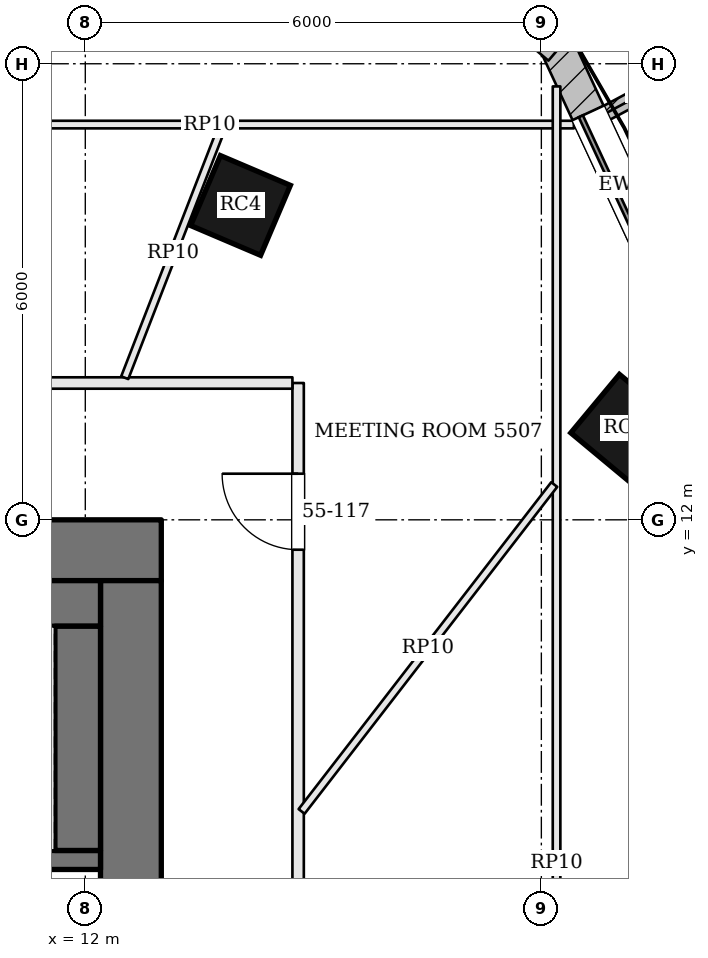
"""IFC4 building model, lengths in metres.
Left out: names, types, materials, properties, quantities, classifications, styles, units other than length and angle.
Written with IfcOpenShell. Run it as: python <this file> out.ifc"""

import sys

from ifc_helpers import new_model, si_unit, direction, frame, frame_2d, origin, origin_2d, place, context, subcontext, project, spatial, rectangle, extrude, element, fill, save


model = new_model("IFC4")
c1 = context("Model", 3, precision=1e-05, world=origin(), true_north=direction((0.0, 1.0)))
c2 = subcontext(c1, "Body", "Model", "MODEL_VIEW")
j1 = project(units=[si_unit("LENGTHUNIT", "METRE"), si_unit("PLANEANGLEUNIT", "RADIAN")], contexts=[c1])
p1 = place(None, origin())
s1 = spatial("IfcSite", under=j1, at=p1, CompositionType="ELEMENT")
p2 = place(p1, origin())
s2 = spatial("IfcBuilding", under=s1, at=p2, CompositionType="ELEMENT")
p3 = place(p2, frame((0.0, 0.0, 225.3)))
s3 = spatial("IfcBuildingStorey", under=s2, at=p3, CompositionType="ELEMENT", Elevation=225.3)
p4 = place(p3, frame((-13.0, 11.6, 0.0), z_axis=(0.0, 0.0, 1.0), x_axis=(1.0, 0.0, 0.0)))
e1 = element("IfcWall", 1, at=p4, inside=s3, PredefinedType="SHEAR", context=c2, shape_type="SweptSolid", body=[
    extrude(rectangle(XDim=26.0, YDim=0.8, at=frame_2d((13.0, 0.0))), origin(), (0.0, 0.0, 1.0), 3.9),
])
p5 = place(p4, frame((9.375, 0.0, 0.0)))
e2 = element("IfcOpeningElement", 2, at=p5, cuts=e1, PredefinedType="OPENING", context=c2, shape_type="SweptSolid", body=[
    extrude(rectangle(XDim=0.7, YDim=2.1, at=frame_2d((0.35, 1.05))), frame((0.0, 0.41, 0.0), z_axis=(0.0, -1.0, 0.0), x_axis=(1.0, 0.0, 0.0)), (0.0, 0.0, 1.0), 0.82),
])
p6 = place(p4, frame((12.075, 0.0, 0.0)))
e3 = element("IfcOpeningElement", 3, at=p6, cuts=e1, PredefinedType="OPENING", context=c2, shape_type="SweptSolid", body=[
    extrude(rectangle(XDim=1.0, YDim=2.1, at=frame_2d((0.5, 1.05))), frame((0.0, 0.41, 0.0), z_axis=(0.0, -1.0, 0.0), x_axis=(1.0, 0.0, 0.0)), (0.0, 0.0, 1.0), 0.82),
])
p7 = place(p4, frame((14.675, 0.0, 0.0)))
e4 = element("IfcOpeningElement", 4, at=p7, cuts=e1, PredefinedType="OPENING", context=c2, shape_type="SweptSolid", body=[
    extrude(rectangle(XDim=0.7, YDim=2.1, at=frame_2d((0.35, 1.05))), frame((0.0, 0.41, 0.0), z_axis=(0.0, -1.0, 0.0), x_axis=(1.0, 0.0, 0.0)), (0.0, 0.0, 1.0), 0.82),
])
p8 = place(p4, frame((16.625, 0.0, 0.0)))
e5 = element("IfcOpeningElement", 5, at=p8, cuts=e1, PredefinedType="OPENING", context=c2, shape_type="SweptSolid", body=[
    extrude(rectangle(XDim=0.9, YDim=2.1, at=frame_2d((0.45, 1.05))), frame((0.0, 0.41, 0.0), z_axis=(0.0, -1.0, 0.0), x_axis=(1.0, 0.0, 0.0)), (0.0, 0.0, 1.0), 0.82),
])
p9 = place(p3, frame((12.6, -2.2, 0.0), z_axis=(0.0, 0.0, 1.0), x_axis=(0.0, 1.0, 0.0)))
e6 = element("IfcWall", 6, at=p9, inside=s3, PredefinedType="SHEAR", context=c2, shape_type="SweptSolid", body=[
    extrude(rectangle(XDim=13.4, YDim=0.8, at=frame_2d((6.7, 0.0))), origin(), (0.0, 0.0, 1.0), 3.9),
])
p10 = place(p9, frame((7.4, 0.0, 0.0)))
e7 = element("IfcOpeningElement", 7, at=p10, cuts=e6, PredefinedType="OPENING", context=c2, shape_type="SweptSolid", body=[
    extrude(rectangle(XDim=1.8, YDim=2.1, at=frame_2d((0.9, 1.05))), frame((0.0, 0.41, 0.0), z_axis=(0.0, -1.0, 0.0), x_axis=(1.0, 0.0, 0.0)), (0.0, 0.0, 1.0), 0.82),
])
for number, where, z_axis, x_axis in (
    (8, (19.092, 13.209, 0.0), (0.0, 0.0, 1.0), (-0.769, 0.639, 0.0)),
    (9, (14.042, 16.136, 0.0), (0.0, 0.0, 1.0), (-0.92, 0.392, 0.0)),
):
    element("IfcColumn", number, at=place(p3, frame(where, z_axis=z_axis, x_axis=x_axis)), inside=s3, PredefinedType="COLUMN", context=c2, shape_type="SweptSolid", body=[
        extrude(rectangle(XDim=1.0, YDim=1.0, at=origin_2d()), origin(), (0.0, 0.0, 1.0), 3.9),
    ])
p11 = place(p3, frame((19.931, 14.519, 0.0), z_axis=(0.0, 0.0, 1.0), x_axis=(-0.421138964136, 0.906996126169, 0.0)))
e10 = element("IfcWall", 10, at=p11, inside=s3, PredefinedType="SOLIDWALL", context=c2, shape_type="SweptSolid", body=[
    extrude(rectangle(XDim=4.15, YDim=0.45, at=frame_2d((2.075, 0.0))), origin(), (0.0, 0.0, 1.0), 3.7),
])
p12 = place(p11, frame((1.025, 0.0, 0.9)))
e11 = element("IfcOpeningElement", 11, at=p12, cuts=e10, PredefinedType="OPENING", context=c2, shape_type="SweptSolid", body=[
    extrude(rectangle(XDim=2.1, YDim=2.3, at=frame_2d((1.05, 1.15))), frame((0.0, 0.235, 0.0), z_axis=(0.0, -1.0, 0.0), x_axis=(1.0, 0.0, 0.0)), (0.0, 0.0, 1.0), 0.47),
])
p13 = place(p3, frame((18.238, 18.212, 0.0), z_axis=(0.0, 0.0, 1.0), x_axis=(-0.762479604733, 0.647012250554, 0.0)))
e12 = element("IfcWall", 12, at=p13, inside=s3, PredefinedType="SOLIDWALL", context=c2, shape_type="SweptSolid", body=[
    extrude(rectangle(XDim=4.079, YDim=0.45, at=frame_2d((2.039, 0.0))), origin(), (0.0, 0.0, 1.0), 3.7),
])
p14 = place(p13, frame((0.99, 0.0, 0.9)))
e13 = element("IfcOpeningElement", 13, at=p14, cuts=e12, PredefinedType="OPENING", context=c2, shape_type="SweptSolid", body=[
    extrude(rectangle(XDim=2.1, YDim=2.3, at=frame_2d((1.05, 1.15))), frame((0.0, 0.235, 0.0), z_axis=(0.0, -1.0, 0.0), x_axis=(1.0, 0.0, 0.0)), (0.0, 0.0, 1.0), 0.47),
])
p15 = place(p3, frame((18.651, 17.243, 0.0), z_axis=(0.0, 0.0, 1.0), x_axis=(0.882225472329, 0.470827161466, 0.0)))
e14 = element("IfcWall", 14, at=p15, inside=s3, PredefinedType="SOLIDWALL", context=c2, shape_type="SweptSolid", body=[
    extrude(rectangle(XDim=1.75, YDim=0.2, at=frame_2d((0.875, 0.0))), origin(), (0.0, 0.0, 1.0), 3.7),
])
p16 = place(p3, frame((12.2, 7.525, 0.0), z_axis=(0.0, 0.0, 1.0), x_axis=(-1.0, 0.0, 0.0)))
e15 = element("IfcWall", 15, at=p16, inside=s3, PredefinedType="SOLIDWALL", context=c2, shape_type="SweptSolid", body=[
    extrude(rectangle(XDim=7.1, YDim=0.25, at=frame_2d((3.55, 0.0))), origin(), (0.0, 0.0, 1.0), 3.7),
])
p17 = place(p16, frame((5.8, 0.0, 0.0)))
e16 = element("IfcOpeningElement", 16, at=p17, cuts=e15, PredefinedType="OPENING", context=c2, shape_type="SweptSolid", body=[
    extrude(rectangle(XDim=1.2, YDim=2.1, at=frame_2d((0.6, 1.05))), frame((0.0, 0.135, 0.0), z_axis=(0.0, -1.0, 0.0), x_axis=(1.0, 0.0, 0.0)), (0.0, 0.0, 1.0), 0.27),
])
p18 = place(p3, frame((12.2, 10.9, 0.0), z_axis=(0.0, 0.0, 1.0), x_axis=(-1.0, 0.0, 0.0)))
e17 = element("IfcWall", 17, at=p18, inside=s3, PredefinedType="SOLIDWALL", context=c2, shape_type="SweptSolid", body=[
    extrude(rectangle(XDim=7.1, YDim=0.6, at=frame_2d((3.55, 0.0))), origin(), (0.0, 0.0, 1.0), 3.7),
])
p19 = place(p3, frame((11.9, 10.6, 0.0), z_axis=(0.0, 0.0, 1.0), x_axis=(0.0, -1.0, 0.0)))
e18 = element("IfcWall", 18, at=p19, inside=s3, PredefinedType="SOLIDWALL", context=c2, shape_type="SweptSolid", body=[
    extrude(rectangle(XDim=2.95, YDim=0.6, at=frame_2d((1.475, 0.0))), origin(), (0.0, 0.0, 1.0), 3.7),
])
p20 = place(p3, frame((14.8, -2.171, 0.0), z_axis=(0.0, 0.0, 1.0), x_axis=(0.0, 1.0, 0.0)))
e19 = element("IfcWall", 19, at=p20, inside=s3, PredefinedType="PARTITIONING", context=c2, shape_type="SweptSolid", body=[
    extrude(rectangle(XDim=15.971, YDim=0.15, at=frame_2d((7.986, 0.0))), origin(), (0.0, 0.0, 1.0), 3.084),
])
p21 = place(p20, frame((4.2, 0.0, 0.0)))
e20 = element("IfcOpeningElement", 20, at=p21, cuts=e19, PredefinedType="OPENING", context=c2, shape_type="SweptSolid", body=[
    extrude(rectangle(XDim=1.8, YDim=2.1, at=frame_2d((0.9, 1.05))), frame((0.0, 0.085, 0.0), z_axis=(0.0, -1.0, 0.0), x_axis=(1.0, 0.0, 0.0)), (0.0, 0.0, 1.0), 0.17),
])
p22 = place(p20, frame((13.778, 0.0, 0.0)))
e21 = element("IfcOpeningElement", 21, at=p22, cuts=e19, PredefinedType="OPENING", context=c2, shape_type="SweptSolid", body=[
    extrude(rectangle(XDim=1.0, YDim=2.4, at=frame_2d((0.5, 1.2))), frame((0.0, 0.085, 0.0), z_axis=(0.0, -1.0, 0.0), x_axis=(1.0, 0.0, 0.0)), (0.0, 0.0, 1.0), 0.17),
])
p23 = place(p3, frame((14.725, 13.8, 0.0), z_axis=(0.0, 0.0, 1.0), x_axis=(-1.0, 0.0, 0.0)))
e22 = element("IfcWall", 22, at=p23, inside=s3, PredefinedType="PARTITIONING", context=c2, shape_type="SweptSolid", body=[
    extrude(rectangle(XDim=8.873, YDim=0.15, at=frame_2d((4.437, 0.0))), origin(), (0.0, 0.0, 1.0), 3.084),
])
p24 = place(p23, frame((4.95, 0.0, 0.0)))
e23 = element("IfcOpeningElement", 23, at=p24, cuts=e22, PredefinedType="OPENING", context=c2, shape_type="SweptSolid", body=[
    extrude(rectangle(XDim=1.0, YDim=2.1, at=frame_2d((0.5, 1.05))), frame((0.0, 0.085, 0.0), z_axis=(0.0, -1.0, 0.0), x_axis=(1.0, 0.0, 0.0)), (0.0, 0.0, 1.0), 0.17),
])
p25 = place(p3, frame((8.845, 17.2, 0.0), z_axis=(0.0, 0.0, 1.0), x_axis=(1.0, 0.0, 0.0)))
e24 = element("IfcWall", 24, at=p25, inside=s3, PredefinedType="PARTITIONING", context=c2, shape_type="SweptSolid", body=[
    extrude(rectangle(XDim=9.583, YDim=0.1, at=frame_2d((4.791, 0.0))), origin(), (0.0, 0.0, 1.0), 3.084),
])
p26 = place(p3, frame((18.2, 17.702, 0.0), z_axis=(0.0, 0.0, 1.0), x_axis=(0.0, -1.0, 0.0)))
e25 = element("IfcWall", 25, at=p26, inside=s3, PredefinedType="PARTITIONING", context=c2, shape_type="SweptSolid", body=[
    extrude(rectangle(XDim=20.435, YDim=0.1, at=frame_2d((10.218, 0.0))), origin(), (0.0, 0.0, 1.0), 3.084),
])
p27 = place(p26, frame((13.902, 0.0, 0.0)))
e26 = element("IfcOpeningElement", 26, at=p27, cuts=e25, PredefinedType="OPENING", context=c2, shape_type="SweptSolid", body=[
    extrude(rectangle(XDim=1.0, YDim=2.1, at=frame_2d((0.5, 1.05))), frame((0.0, 0.06, 0.0), z_axis=(0.0, -1.0, 0.0), x_axis=(1.0, 0.0, 0.0)), (0.0, 0.0, 1.0), 0.12),
])
p28 = place(p3, frame((14.846, 8.164, 0.0), z_axis=(0.0, 0.0, 1.0), x_axis=(0.611508866017, 0.791237579228, 0.0)))
e27 = element("IfcWall", 27, at=p28, inside=s3, PredefinedType="PARTITIONING", context=c2, shape_type="SweptSolid", body=[
    extrude(rectangle(XDim=5.435, YDim=0.1, at=frame_2d((2.717, 0.0))), origin(), (0.0, 0.0, 1.0), 3.084),
])
p29 = place(p3, frame((12.519, 13.87, 0.0), z_axis=(0.0, 0.0, 1.0), x_axis=(0.361713546528, 0.932289284642, 0.0)))
e28 = element("IfcWall", 28, at=p29, inside=s3, PredefinedType="PARTITIONING", context=c2, shape_type="SweptSolid", body=[
    extrude(rectangle(XDim=3.522, YDim=0.1, at=frame_2d((1.761, 0.0))), origin(), (0.0, 0.0, 1.0), 3.084),
])
p30 = place(p12, origin())
e29 = element("IfcWindow", 29, at=p30, inside=s3, PartitioningType="SINGLE_PANEL", PredefinedType="WINDOW", context=c2, shape_type="SweptSolid", body=[
    extrude(rectangle(XDim=2.1, YDim=2.3, at=frame_2d((1.05, 1.15))), frame((0.0, 0.135, 0.0), z_axis=(0.0, -1.0, 0.0), x_axis=(1.0, 0.0, 0.0)), (0.0, 0.0, 1.0), 0.06),
])
fill(e11, e29)
p31 = place(p22, origin())
e30 = element("IfcDoor", 30, at=p31, inside=s3, OperationType="SINGLE_SWING_RIGHT", PredefinedType="DOOR", context=c2, shape_type="SweptSolid", body=[
    extrude(rectangle(XDim=1.0, YDim=2.4, at=frame_2d((0.5, 1.2))), frame((0.0, 0.025, 0.0), z_axis=(0.0, -1.0, 0.0), x_axis=(1.0, 0.0, 0.0)), (0.0, 0.0, 1.0), 0.05),
])
fill(e21, e30)
save(model, sys.argv[1])
